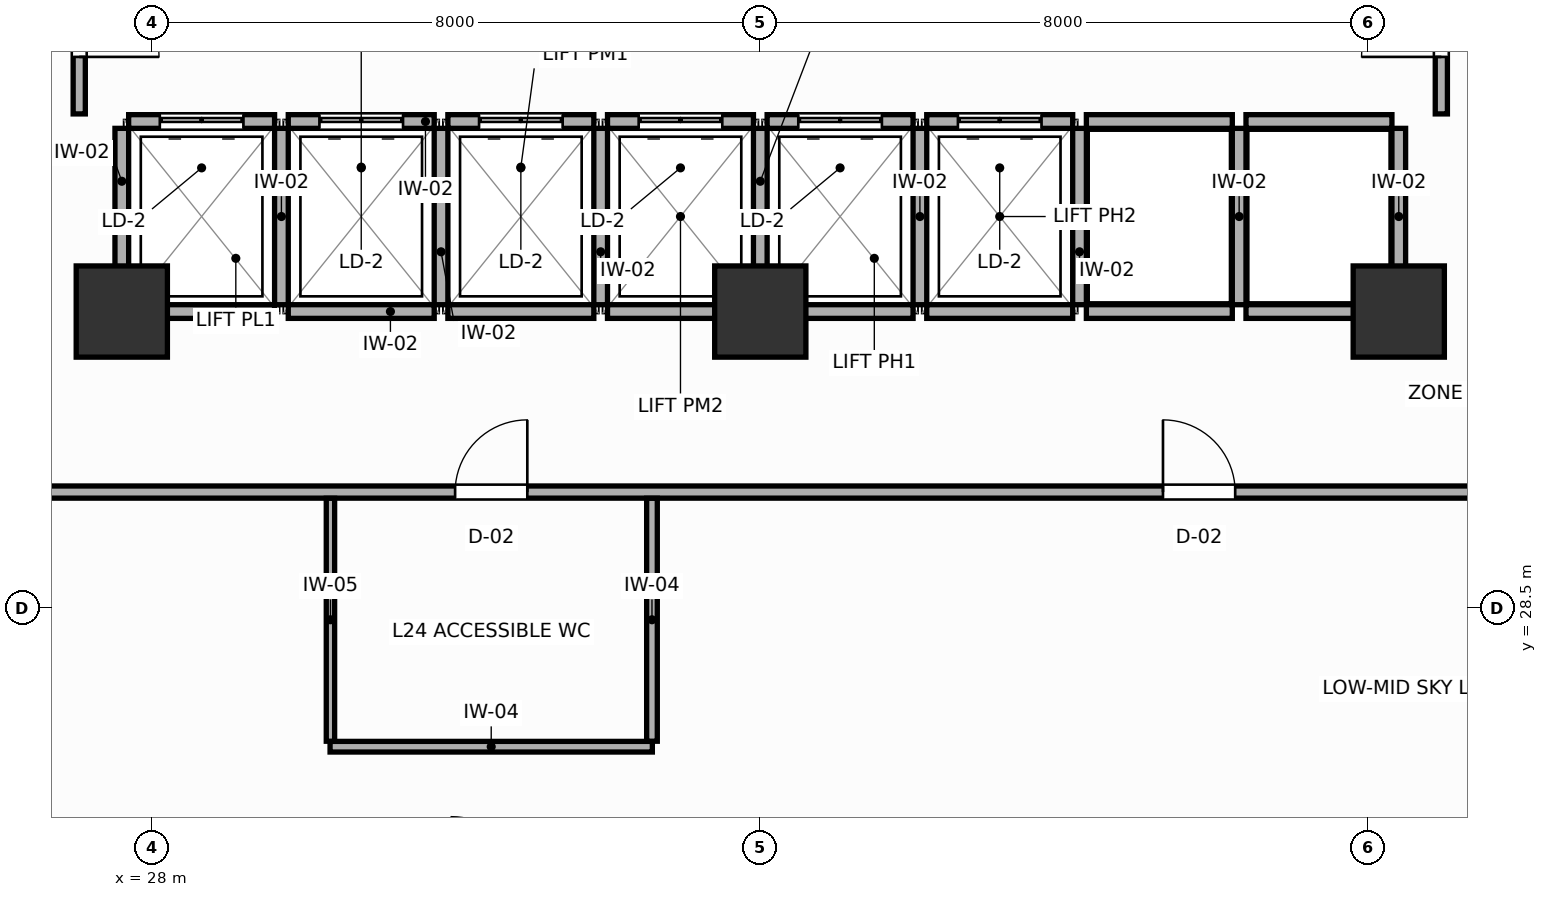
"""IFC4 building model, lengths in metres.
Left out: names, types, materials, properties, quantities, classifications, styles, units other than length and angle.
Written with IfcOpenShell. Run it as: python <this file> out.ifc"""

import sys

from ifc_helpers import new_model, si_unit, direction, frame, frame_2d, origin, origin_2d, place, context, subcontext, project, spatial, rectangle, extrude, source, transform, mapped, element, fill, save


model = new_model("IFC4")
c1 = context("Model", 3, precision=1e-05, world=origin(), true_north=direction((0.0, 1.0)))
c2 = subcontext(c1, "Body", "Model", "MODEL_VIEW")
j1 = project(units=[si_unit("LENGTHUNIT", "METRE"), si_unit("PLANEANGLEUNIT", "RADIAN")], contexts=[c1])
p1 = place(None, origin())
s1 = spatial("IfcSite", under=j1, at=p1, CompositionType="ELEMENT")
p2 = place(p1, origin())
s2 = spatial("IfcBuilding", under=s1, at=p2, CompositionType="ELEMENT")
p3 = place(p2, frame((0.0, 0.0, 99.0)))
s3 = spatial("IfcBuildingStorey", under=s2, at=p3, CompositionType="ELEMENT", Elevation=99.0)
m1 = source(origin(), c2, "Body", "SweptSolid", [
    extrude(rectangle(XDim=1.2, YDim=1.2, at=origin_2d()), origin(), (0.0, 0.0, 1.0), 3.6),
])
for number, where, z_axis, x_axis in (
    (1, (27.6, 32.4, 0.0), (0.0, 0.0, 1.0), (1.0, 0.0, 0.0)),
    (2, (44.4, 32.4, 0.0), (0.0, 0.0, 1.0), (1.0, 0.0, 0.0)),
    (3, (36.0, 32.4, 0.0), (0.0, 0.0, 1.0), (1.0, 0.0, 0.0)),
):
    element("IfcColumn", number, at=place(p3, frame(where, z_axis=z_axis, x_axis=x_axis)), inside=s3, PredefinedType="COLUMN", context=c2, shape_type="MappedRepresentation", body=[
        mapped(m1, transform((0.0, 0.0, 0.0), scale=1.0)),
    ])
p4 = place(p3, frame((27.69, 34.9, 0.0), z_axis=(0.0, 0.0, 1.0), x_axis=(1.0, 0.0, 0.0)))
e4 = element("IfcWall", 4, at=p4, inside=s3, PredefinedType="PARTITIONING", context=c2, shape_type="SweptSolid", body=[
    extrude(rectangle(XDim=1.92, YDim=0.18, at=frame_2d((0.96, 0.0))), origin(), (0.0, 0.0, 1.0), 3.4),
])
p5 = place(p4, frame((0.41, 0.0, 0.0)))
e5 = element("IfcOpeningElement", 5, at=p5, cuts=e4, PredefinedType="OPENING", context=c2, shape_type="SweptSolid", body=[
    extrude(rectangle(XDim=1.1, YDim=2.1, at=frame_2d((0.55, 1.05))), frame((0.0, 0.1, 0.0), z_axis=(0.0, -1.0, 0.0), x_axis=(1.0, 0.0, 0.0)), (0.0, 0.0, 1.0), 0.2),
])
p6 = place(p3, frame((27.69, 32.4, 0.0), z_axis=(0.0, 0.0, 1.0), x_axis=(1.0, 0.0, 0.0)))
e6 = element("IfcWall", 6, at=p6, inside=s3, PredefinedType="PARTITIONING", context=c2, shape_type="SweptSolid", body=[
    extrude(rectangle(XDim=1.92, YDim=0.18, at=frame_2d((0.96, 0.0))), origin(), (0.0, 0.0, 1.0), 2.95),
])
p7 = place(p3, frame((27.6, 32.49, 0.0), z_axis=(0.0, 0.0, 1.0), x_axis=(0.0, 1.0, 0.0)))
e7 = element("IfcWall", 7, at=p7, inside=s3, PredefinedType="PARTITIONING", context=c2, shape_type="SweptSolid", body=[
    extrude(rectangle(XDim=2.32, YDim=0.18, at=frame_2d((1.16, 0.0))), origin(), (0.0, 0.0, 1.0), 3.4),
])
p8 = place(p3, frame((29.79, 34.9, 0.0), z_axis=(0.0, 0.0, 1.0), x_axis=(1.0, 0.0, 0.0)))
e8 = element("IfcWall", 8, at=p8, inside=s3, PredefinedType="PARTITIONING", context=c2, shape_type="SweptSolid", body=[
    extrude(rectangle(XDim=1.92, YDim=0.18, at=frame_2d((0.96, 0.0))), origin(), (0.0, 0.0, 1.0), 3.4),
])
p9 = place(p8, frame((0.41, 0.0, 0.0)))
e9 = element("IfcOpeningElement", 9, at=p9, cuts=e8, PredefinedType="OPENING", context=c2, shape_type="SweptSolid", body=[
    extrude(rectangle(XDim=1.1, YDim=2.1, at=frame_2d((0.55, 1.05))), frame((0.0, 0.1, 0.0), z_axis=(0.0, -1.0, 0.0), x_axis=(1.0, 0.0, 0.0)), (0.0, 0.0, 1.0), 0.2),
])
p10 = place(p3, frame((29.79, 32.4, 0.0), z_axis=(0.0, 0.0, 1.0), x_axis=(1.0, 0.0, 0.0)))
e10 = element("IfcWall", 10, at=p10, inside=s3, PredefinedType="PARTITIONING", context=c2, shape_type="SweptSolid", body=[
    extrude(rectangle(XDim=1.92, YDim=0.18, at=frame_2d((0.96, 0.0))), origin(), (0.0, 0.0, 1.0), 2.95),
])
p11 = place(p3, frame((29.7, 32.49, 0.0), z_axis=(0.0, 0.0, 1.0), x_axis=(0.0, 1.0, 0.0)))
e11 = element("IfcWall", 11, at=p11, inside=s3, PredefinedType="PARTITIONING", context=c2, shape_type="SweptSolid", body=[
    extrude(rectangle(XDim=2.32, YDim=0.18, at=frame_2d((1.16, 0.0))), origin(), (0.0, 0.0, 1.0), 3.4),
])
p12 = place(p3, frame((31.89, 34.9, 0.0), z_axis=(0.0, 0.0, 1.0), x_axis=(1.0, 0.0, 0.0)))
e12 = element("IfcWall", 12, at=p12, inside=s3, PredefinedType="PARTITIONING", context=c2, shape_type="SweptSolid", body=[
    extrude(rectangle(XDim=1.92, YDim=0.18, at=frame_2d((0.96, 0.0))), origin(), (0.0, 0.0, 1.0), 3.4),
])
p13 = place(p12, frame((0.41, 0.0, 0.0)))
e13 = element("IfcOpeningElement", 13, at=p13, cuts=e12, PredefinedType="OPENING", context=c2, shape_type="SweptSolid", body=[
    extrude(rectangle(XDim=1.1, YDim=2.1, at=frame_2d((0.55, 1.05))), frame((0.0, 0.1, 0.0), z_axis=(0.0, -1.0, 0.0), x_axis=(1.0, 0.0, 0.0)), (0.0, 0.0, 1.0), 0.2),
])
p14 = place(p3, frame((31.89, 32.4, 0.0), z_axis=(0.0, 0.0, 1.0), x_axis=(1.0, 0.0, 0.0)))
e14 = element("IfcWall", 14, at=p14, inside=s3, PredefinedType="PARTITIONING", context=c2, shape_type="SweptSolid", body=[
    extrude(rectangle(XDim=1.92, YDim=0.18, at=frame_2d((0.96, 0.0))), origin(), (0.0, 0.0, 1.0), 2.95),
])
p15 = place(p3, frame((31.8, 32.49, 0.0), z_axis=(0.0, 0.0, 1.0), x_axis=(0.0, 1.0, 0.0)))
e15 = element("IfcWall", 15, at=p15, inside=s3, PredefinedType="PARTITIONING", context=c2, shape_type="SweptSolid", body=[
    extrude(rectangle(XDim=2.32, YDim=0.18, at=frame_2d((1.16, 0.0))), origin(), (0.0, 0.0, 1.0), 3.4),
])
p16 = place(p3, frame((33.99, 34.9, 0.0), z_axis=(0.0, 0.0, 1.0), x_axis=(1.0, 0.0, 0.0)))
e16 = element("IfcWall", 16, at=p16, inside=s3, PredefinedType="PARTITIONING", context=c2, shape_type="SweptSolid", body=[
    extrude(rectangle(XDim=1.92, YDim=0.18, at=frame_2d((0.96, 0.0))), origin(), (0.0, 0.0, 1.0), 3.4),
])
p17 = place(p16, frame((0.41, 0.0, 0.0)))
e17 = element("IfcOpeningElement", 17, at=p17, cuts=e16, PredefinedType="OPENING", context=c2, shape_type="SweptSolid", body=[
    extrude(rectangle(XDim=1.1, YDim=2.1, at=frame_2d((0.55, 1.05))), frame((0.0, 0.1, 0.0), z_axis=(0.0, -1.0, 0.0), x_axis=(1.0, 0.0, 0.0)), (0.0, 0.0, 1.0), 0.2),
])
p18 = place(p3, frame((33.99, 32.4, 0.0), z_axis=(0.0, 0.0, 1.0), x_axis=(1.0, 0.0, 0.0)))
e18 = element("IfcWall", 18, at=p18, inside=s3, PredefinedType="PARTITIONING", context=c2, shape_type="SweptSolid", body=[
    extrude(rectangle(XDim=1.92, YDim=0.18, at=frame_2d((0.96, 0.0))), origin(), (0.0, 0.0, 1.0), 2.95),
])
p19 = place(p3, frame((33.9, 32.49, 0.0), z_axis=(0.0, 0.0, 1.0), x_axis=(0.0, 1.0, 0.0)))
e19 = element("IfcWall", 19, at=p19, inside=s3, PredefinedType="PARTITIONING", context=c2, shape_type="SweptSolid", body=[
    extrude(rectangle(XDim=2.32, YDim=0.18, at=frame_2d((1.16, 0.0))), origin(), (0.0, 0.0, 1.0), 3.4),
])
p20 = place(p3, frame((36.09, 34.9, 0.0), z_axis=(0.0, 0.0, 1.0), x_axis=(1.0, 0.0, 0.0)))
e20 = element("IfcWall", 20, at=p20, inside=s3, PredefinedType="PARTITIONING", context=c2, shape_type="SweptSolid", body=[
    extrude(rectangle(XDim=1.92, YDim=0.18, at=frame_2d((0.96, 0.0))), origin(), (0.0, 0.0, 1.0), 3.4),
])
p21 = place(p20, frame((0.41, 0.0, 0.0)))
e21 = element("IfcOpeningElement", 21, at=p21, cuts=e20, PredefinedType="OPENING", context=c2, shape_type="SweptSolid", body=[
    extrude(rectangle(XDim=1.1, YDim=2.1, at=frame_2d((0.55, 1.05))), frame((0.0, 0.1, 0.0), z_axis=(0.0, -1.0, 0.0), x_axis=(1.0, 0.0, 0.0)), (0.0, 0.0, 1.0), 0.2),
])
p22 = place(p3, frame((36.09, 32.4, 0.0), z_axis=(0.0, 0.0, 1.0), x_axis=(1.0, 0.0, 0.0)))
e22 = element("IfcWall", 22, at=p22, inside=s3, PredefinedType="PARTITIONING", context=c2, shape_type="SweptSolid", body=[
    extrude(rectangle(XDim=1.92, YDim=0.18, at=frame_2d((0.96, 0.0))), origin(), (0.0, 0.0, 1.0), 2.95),
])
p23 = place(p3, frame((36.0, 32.49, 0.0), z_axis=(0.0, 0.0, 1.0), x_axis=(0.0, 1.0, 0.0)))
e23 = element("IfcWall", 23, at=p23, inside=s3, PredefinedType="PARTITIONING", context=c2, shape_type="SweptSolid", body=[
    extrude(rectangle(XDim=2.32, YDim=0.18, at=frame_2d((1.16, 0.0))), origin(), (0.0, 0.0, 1.0), 3.4),
])
p24 = place(p3, frame((38.19, 34.9, 0.0), z_axis=(0.0, 0.0, 1.0), x_axis=(1.0, 0.0, 0.0)))
e24 = element("IfcWall", 24, at=p24, inside=s3, PredefinedType="PARTITIONING", context=c2, shape_type="SweptSolid", body=[
    extrude(rectangle(XDim=1.92, YDim=0.18, at=frame_2d((0.96, 0.0))), origin(), (0.0, 0.0, 1.0), 3.4),
])
p25 = place(p24, frame((0.41, 0.0, 0.0)))
e25 = element("IfcOpeningElement", 25, at=p25, cuts=e24, PredefinedType="OPENING", context=c2, shape_type="SweptSolid", body=[
    extrude(rectangle(XDim=1.1, YDim=2.1, at=frame_2d((0.55, 1.05))), frame((0.0, 0.1, 0.0), z_axis=(0.0, -1.0, 0.0), x_axis=(1.0, 0.0, 0.0)), (0.0, 0.0, 1.0), 0.2),
])
p26 = place(p3, frame((38.19, 32.4, 0.0), z_axis=(0.0, 0.0, 1.0), x_axis=(1.0, 0.0, 0.0)))
e26 = element("IfcWall", 26, at=p26, inside=s3, PredefinedType="PARTITIONING", context=c2, shape_type="SweptSolid", body=[
    extrude(rectangle(XDim=1.92, YDim=0.18, at=frame_2d((0.96, 0.0))), origin(), (0.0, 0.0, 1.0), 2.95),
])
p27 = place(p3, frame((38.1, 32.49, 0.0), z_axis=(0.0, 0.0, 1.0), x_axis=(0.0, 1.0, 0.0)))
e27 = element("IfcWall", 27, at=p27, inside=s3, PredefinedType="PARTITIONING", context=c2, shape_type="SweptSolid", body=[
    extrude(rectangle(XDim=2.32, YDim=0.18, at=frame_2d((1.16, 0.0))), origin(), (0.0, 0.0, 1.0), 3.4),
])
p28 = place(p3, frame((40.29, 34.9, 0.0), z_axis=(0.0, 0.0, 1.0), x_axis=(1.0, 0.0, 0.0)))
e28 = element("IfcWall", 28, at=p28, inside=s3, PredefinedType="PARTITIONING", context=c2, shape_type="SweptSolid", body=[
    extrude(rectangle(XDim=1.92, YDim=0.18, at=frame_2d((0.96, 0.0))), origin(), (0.0, 0.0, 1.0), 3.4),
])
p29 = place(p3, frame((40.29, 32.4, 0.0), z_axis=(0.0, 0.0, 1.0), x_axis=(1.0, 0.0, 0.0)))
e29 = element("IfcWall", 29, at=p29, inside=s3, PredefinedType="PARTITIONING", context=c2, shape_type="SweptSolid", body=[
    extrude(rectangle(XDim=1.92, YDim=0.18, at=frame_2d((0.96, 0.0))), origin(), (0.0, 0.0, 1.0), 2.95),
])
p30 = place(p3, frame((40.2, 32.49, 0.0), z_axis=(0.0, 0.0, 1.0), x_axis=(0.0, 1.0, 0.0)))
e30 = element("IfcWall", 30, at=p30, inside=s3, PredefinedType="PARTITIONING", context=c2, shape_type="SweptSolid", body=[
    extrude(rectangle(XDim=2.32, YDim=0.18, at=frame_2d((1.16, 0.0))), origin(), (0.0, 0.0, 1.0), 3.4),
])
p31 = place(p3, frame((42.39, 34.9, 0.0), z_axis=(0.0, 0.0, 1.0), x_axis=(1.0, 0.0, 0.0)))
e31 = element("IfcWall", 31, at=p31, inside=s3, PredefinedType="PARTITIONING", context=c2, shape_type="SweptSolid", body=[
    extrude(rectangle(XDim=1.92, YDim=0.18, at=frame_2d((0.96, 0.0))), origin(), (0.0, 0.0, 1.0), 3.4),
])
p32 = place(p3, frame((42.39, 32.4, 0.0), z_axis=(0.0, 0.0, 1.0), x_axis=(1.0, 0.0, 0.0)))
e32 = element("IfcWall", 32, at=p32, inside=s3, PredefinedType="PARTITIONING", context=c2, shape_type="SweptSolid", body=[
    extrude(rectangle(XDim=1.92, YDim=0.18, at=frame_2d((0.96, 0.0))), origin(), (0.0, 0.0, 1.0), 2.95),
])
for number, where, z_axis, x_axis in (
    (33, (42.3, 32.49, 0.0), (0.0, 0.0, 1.0), (0.0, 1.0, 0.0)),
    (34, (44.4, 32.49, 0.0), (0.0, 0.0, 1.0), (0.0, 1.0, 0.0)),
):
    element("IfcWall", number, at=place(p3, frame(where, z_axis=z_axis, x_axis=x_axis)), inside=s3, PredefinedType="PARTITIONING", context=c2, shape_type="SweptSolid", body=[
        extrude(rectangle(XDim=2.32, YDim=0.18, at=frame_2d((1.16, 0.0))), origin(), (0.0, 0.0, 1.0), 3.4),
    ])
p33 = place(p3, frame((27.04, 35.0, 0.0), z_axis=(0.0, 0.0, 1.0), x_axis=(0.0, 1.0, 0.0)))
e35 = element("IfcWall", 35, at=p33, inside=s3, PredefinedType="PARTITIONING", context=c2, shape_type="SweptSolid", body=[
    extrude(rectangle(XDim=2.65, YDim=0.16, at=frame_2d((1.325, 0.0))), origin(), (0.0, 0.0, 1.0), 3.4),
])
p34 = place(p33, frame((0.75, 0.0, 0.0)))
e36 = element("IfcOpeningElement", 36, at=p34, cuts=e35, PredefinedType="OPENING", context=c2, shape_type="SweptSolid", body=[
    extrude(rectangle(XDim=1.05, YDim=2.1, at=frame_2d((0.525, 1.05))), frame((0.0, 0.09, 0.0), z_axis=(0.0, -1.0, 0.0), x_axis=(1.0, 0.0, 0.0)), (0.0, 0.0, 1.0), 0.18),
])
p35 = place(p3, frame((44.96, 35.0, 0.0), z_axis=(0.0, 0.0, 1.0), x_axis=(0.0, 1.0, 0.0)))
e37 = element("IfcWall", 37, at=p35, inside=s3, PredefinedType="PARTITIONING", context=c2, shape_type="SweptSolid", body=[
    extrude(rectangle(XDim=2.65, YDim=0.16, at=frame_2d((1.325, 0.0))), origin(), (0.0, 0.0, 1.0), 3.4),
])
p36 = place(p35, frame((0.75, 0.0, 0.0)))
e38 = element("IfcOpeningElement", 38, at=p36, cuts=e37, PredefinedType="OPENING", context=c2, shape_type="SweptSolid", body=[
    extrude(rectangle(XDim=1.05, YDim=2.1, at=frame_2d((0.525, 1.05))), frame((0.0, 0.09, 0.0), z_axis=(0.0, -1.0, 0.0), x_axis=(1.0, 0.0, 0.0)), (0.0, 0.0, 1.0), 0.18),
])
p37 = place(p3, frame((17.702, 30.025, 0.0), z_axis=(0.0, 0.0, 1.0), x_axis=(1.0, 0.0, 0.0)))
e39 = element("IfcWall", 39, at=p37, inside=s3, PredefinedType="PARTITIONING", context=c2, shape_type="SweptSolid", body=[
    extrude(rectangle(XDim=36.596, YDim=0.16, at=frame_2d((18.298, 0.0))), origin(), (0.0, 0.0, 1.0), 3.4),
])
p38 = place(p37, frame((14.283, 0.0, 0.0)))
e40 = element("IfcOpeningElement", 40, at=p38, cuts=e39, PredefinedType="OPENING", context=c2, shape_type="SweptSolid", body=[
    extrude(rectangle(XDim=0.95, YDim=2.05, at=frame_2d((0.475, 1.025))), frame((0.0, 0.09, 0.0), z_axis=(0.0, -1.0, 0.0), x_axis=(1.0, 0.0, 0.0)), (0.0, 0.0, 1.0), 0.18),
])
p39 = place(p37, frame((23.596, 0.0, 0.0)))
e41 = element("IfcOpeningElement", 41, at=p39, cuts=e39, PredefinedType="OPENING", context=c2, shape_type="SweptSolid", body=[
    extrude(rectangle(XDim=0.95, YDim=2.05, at=frame_2d((0.475, 1.025))), frame((0.0, 0.09, 0.0), z_axis=(0.0, -1.0, 0.0), x_axis=(1.0, 0.0, 0.0)), (0.0, 0.0, 1.0), 0.18),
])
p40 = place(p3, frame((30.34, 26.675, 0.0), z_axis=(0.0, 0.0, 1.0), x_axis=(1.0, 0.0, 0.0)))
e42 = element("IfcWall", 42, at=p40, inside=s3, PredefinedType="PARTITIONING", context=c2, shape_type="SweptSolid", body=[
    extrude(rectangle(XDim=4.24, YDim=0.14, at=frame_2d((2.12, 0.0))), origin(), (0.0, 0.0, 1.0), 3.4),
])
p41 = place(p3, frame((34.575, 26.747, 0.0), z_axis=(0.0, 0.0, 1.0), x_axis=(0.0, 1.0, 0.0)))
e43 = element("IfcWall", 43, at=p41, inside=s3, PredefinedType="PARTITIONING", context=c2, shape_type="SweptSolid", body=[
    extrude(rectangle(XDim=3.196, YDim=0.14, at=frame_2d((1.598, 0.0))), origin(), (0.0, 0.0, 1.0), 3.4),
])
p42 = place(p3, frame((30.345, 26.747, 0.0), z_axis=(0.0, 0.0, 1.0), x_axis=(0.0, 1.0, 0.0)))
e44 = element("IfcWall", 44, at=p42, inside=s3, PredefinedType="MOVABLE", context=c2, shape_type="SweptSolid", body=[
    extrude(rectangle(XDim=3.196, YDim=0.11, at=frame_2d((1.598, 0.0))), origin(), (0.0, 0.0, 1.0), 3.4),
])
p43 = place(p5, origin())
e45 = element("IfcDoor", 45, at=p43, inside=s3, OperationType="DOUBLE_DOOR_SLIDING", PredefinedType="DOOR", context=c2, shape_type="SweptSolid", body=[
    extrude(rectangle(XDim=1.1, YDim=2.1, at=frame_2d((0.55, 1.05))), frame((0.0, 0.025, 0.0), z_axis=(0.0, -1.0, 0.0), x_axis=(1.0, 0.0, 0.0)), (0.0, 0.0, 1.0), 0.05),
])
fill(e5, e45)
p44 = place(p9, origin())
e46 = element("IfcDoor", 46, at=p44, inside=s3, OperationType="DOUBLE_DOOR_SLIDING", PredefinedType="DOOR", context=c2, shape_type="SweptSolid", body=[
    extrude(rectangle(XDim=1.1, YDim=2.1, at=frame_2d((0.55, 1.05))), frame((0.0, 0.025, 0.0), z_axis=(0.0, -1.0, 0.0), x_axis=(1.0, 0.0, 0.0)), (0.0, 0.0, 1.0), 0.05),
])
fill(e9, e46)
p45 = place(p13, origin())
e47 = element("IfcDoor", 47, at=p45, inside=s3, OperationType="DOUBLE_DOOR_SLIDING", PredefinedType="DOOR", context=c2, shape_type="SweptSolid", body=[
    extrude(rectangle(XDim=1.1, YDim=2.1, at=frame_2d((0.55, 1.05))), frame((0.0, 0.025, 0.0), z_axis=(0.0, -1.0, 0.0), x_axis=(1.0, 0.0, 0.0)), (0.0, 0.0, 1.0), 0.05),
])
fill(e13, e47)
p46 = place(p17, origin())
e48 = element("IfcDoor", 48, at=p46, inside=s3, OperationType="DOUBLE_DOOR_SLIDING", PredefinedType="DOOR", context=c2, shape_type="SweptSolid", body=[
    extrude(rectangle(XDim=1.1, YDim=2.1, at=frame_2d((0.55, 1.05))), frame((0.0, 0.025, 0.0), z_axis=(0.0, -1.0, 0.0), x_axis=(1.0, 0.0, 0.0)), (0.0, 0.0, 1.0), 0.05),
])
fill(e17, e48)
p47 = place(p21, origin())
e49 = element("IfcDoor", 49, at=p47, inside=s3, OperationType="DOUBLE_DOOR_SLIDING", PredefinedType="DOOR", context=c2, shape_type="SweptSolid", body=[
    extrude(rectangle(XDim=1.1, YDim=2.1, at=frame_2d((0.55, 1.05))), frame((0.0, 0.025, 0.0), z_axis=(0.0, -1.0, 0.0), x_axis=(1.0, 0.0, 0.0)), (0.0, 0.0, 1.0), 0.05),
])
fill(e21, e49)
p48 = place(p25, origin())
e50 = element("IfcDoor", 50, at=p48, inside=s3, OperationType="DOUBLE_DOOR_SLIDING", PredefinedType="DOOR", context=c2, shape_type="SweptSolid", body=[
    extrude(rectangle(XDim=1.1, YDim=2.1, at=frame_2d((0.55, 1.05))), frame((0.0, 0.025, 0.0), z_axis=(0.0, -1.0, 0.0), x_axis=(1.0, 0.0, 0.0)), (0.0, 0.0, 1.0), 0.05),
])
fill(e25, e50)
p49 = place(p34, frame((1.05, 0.0, 0.0), z_axis=(0.0, 0.0, 1.0), x_axis=(-1.0, 0.0, 0.0)))
e51 = element("IfcDoor", 51, at=p49, inside=s3, OperationType="SINGLE_SWING_RIGHT", PredefinedType="DOOR", context=c2, shape_type="SweptSolid", body=[
    extrude(rectangle(XDim=1.05, YDim=2.1, at=frame_2d((0.525, 1.05))), frame((0.0, 0.025, 0.0), z_axis=(0.0, -1.0, 0.0), x_axis=(1.0, 0.0, 0.0)), (0.0, 0.0, 1.0), 0.05),
])
fill(e36, e51)
p50 = place(p36, origin())
e52 = element("IfcDoor", 52, at=p50, inside=s3, OperationType="SINGLE_SWING_LEFT", PredefinedType="DOOR", context=c2, shape_type="SweptSolid", body=[
    extrude(rectangle(XDim=1.05, YDim=2.1, at=frame_2d((0.525, 1.05))), frame((0.0, 0.025, 0.0), z_axis=(0.0, -1.0, 0.0), x_axis=(1.0, 0.0, 0.0)), (0.0, 0.0, 1.0), 0.05),
])
fill(e38, e52)
p51 = place(p38, origin())
e53 = element("IfcDoor", 53, at=p51, inside=s3, OperationType="SINGLE_SWING_RIGHT", PredefinedType="DOOR", context=c2, shape_type="SweptSolid", body=[
    extrude(rectangle(XDim=0.95, YDim=2.05, at=frame_2d((0.475, 1.025))), frame((0.0, 0.025, 0.0), z_axis=(0.0, -1.0, 0.0), x_axis=(1.0, 0.0, 0.0)), (0.0, 0.0, 1.0), 0.05),
])
fill(e40, e53)
p52 = place(p39, origin())
e54 = element("IfcDoor", 54, at=p52, inside=s3, OperationType="SINGLE_SWING_LEFT", PredefinedType="DOOR", context=c2, shape_type="SweptSolid", body=[
    extrude(rectangle(XDim=0.95, YDim=2.05, at=frame_2d((0.475, 1.025))), frame((0.0, 0.025, 0.0), z_axis=(0.0, -1.0, 0.0), x_axis=(1.0, 0.0, 0.0)), (0.0, 0.0, 1.0), 0.05),
])
fill(e41, e54)
save(model, sys.argv[1])
